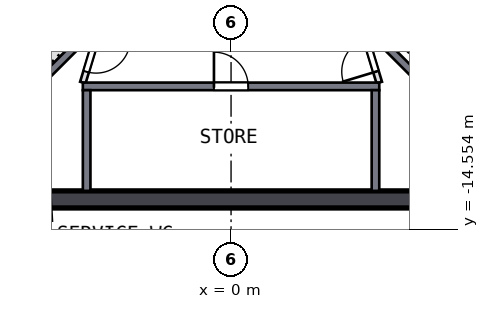
"""IFC4 building model, lengths in metres.
Left out: names, types, materials, properties, quantities, classifications, styles, units other than length and angle.
Written with IfcOpenShell. Run it as: python <this file> out.ifc"""

import sys

from ifc_helpers import new_model, si_unit, direction, frame, frame_2d, origin, place, context, subcontext, project, spatial, rectangle, extrude, element, fill, save


model = new_model("IFC4")
c1 = context("Model", 3, precision=1e-05, world=origin(), true_north=direction((0.0, 1.0)))
c2 = subcontext(c1, "Body", "Model", "MODEL_VIEW")
j1 = project(units=[si_unit("LENGTHUNIT", "METRE"), si_unit("PLANEANGLEUNIT", "RADIAN")], contexts=[c1])
p1 = place(None, origin())
s1 = spatial("IfcSite", under=j1, at=p1, CompositionType="ELEMENT")
p2 = place(p1, origin())
s2 = spatial("IfcBuilding", under=s1, at=p2, CompositionType="ELEMENT")
p3 = place(p2, frame((0.0, 0.0, 295.0)))
s3 = spatial("IfcBuildingStorey", under=s2, at=p3, CompositionType="ELEMENT", Elevation=295.0)
p4 = place(p3, frame((-5.799, -13.775, 0.0), z_axis=(0.0, 0.0, 1.0), x_axis=(1.0, 0.0, 0.0)))
e1 = element("IfcWall", 1, at=p4, inside=s3, PredefinedType="SHEAR", context=c2, shape_type="SweptSolid", body=[
    extrude(rectangle(XDim=11.598, YDim=0.45, at=frame_2d((5.799, 0.0))), origin(), (0.0, 0.0, 1.0), 4.5),
])
p5 = place(p3, frame((-3.9, -10.8, 0.0), z_axis=(0.0, 0.0, 1.0), x_axis=(1.0, 0.0, 0.0)))
e2 = element("IfcWall", 2, at=p5, inside=s3, PredefinedType="SOLIDWALL", context=c2, shape_type="SweptSolid", body=[
    extrude(rectangle(XDim=7.8, YDim=0.2, at=frame_2d((3.9, 0.0))), origin(), (0.0, 0.0, 1.0), 4.19),
])
p6 = place(p5, frame((3.45, 0.0, 0.0)))
e3 = element("IfcOpeningElement", 3, at=p6, cuts=e2, PredefinedType="OPENING", context=c2, shape_type="SweptSolid", body=[
    extrude(rectangle(XDim=0.9, YDim=2.1, at=frame_2d((0.45, 1.05))), frame((0.0, 0.11, 0.0), z_axis=(0.0, -1.0, 0.0), x_axis=(1.0, 0.0, 0.0)), (0.0, 0.0, 1.0), 0.22),
])
for number, where, z_axis, x_axis in (
    (4, (-3.8, -10.9, 0.0), (0.0, 0.0, 1.0), (0.0, -1.0, 0.0)),
    (5, (3.8, -10.9, 0.0), (0.0, 0.0, 1.0), (0.0, -1.0, 0.0)),
):
    element("IfcWall", number, at=place(p3, frame(where, z_axis=z_axis, x_axis=x_axis)), inside=s3, PredefinedType="SOLIDWALL", context=c2, shape_type="SweptSolid", body=[
        extrude(rectangle(XDim=2.65, YDim=0.2, at=frame_2d((1.325, 0.0))), origin(), (0.0, 0.0, 1.0), 4.19),
    ])
for number, where, z_axis, x_axis in (
    (6, (-3.677, -9.334, 0.0), (0.0, 0.0, 1.0), (-0.707, -0.707, 0.0)),
    (7, (3.677, -9.334, 0.0), (0.0, 0.0, 1.0), (0.707, -0.707, 0.0)),
):
    element("IfcWall", number, at=place(p3, frame(where, z_axis=z_axis, x_axis=x_axis)), inside=s3, PredefinedType="SOLIDWALL", context=c2, shape_type="SweptSolid", body=[
        extrude(rectangle(XDim=4.35, YDim=0.2, at=frame_2d((2.175, 0.0))), origin(), (0.0, 0.0, 1.0), 4.19),
    ])
p7 = place(p3, frame((-3.465, -9.263, 0.0), z_axis=(0.0, 0.0, 1.0), x_axis=(-0.289808785, -0.957084567, 0.0)))
e8 = element("IfcWall", 8, at=p7, inside=s3, PredefinedType="PARTITIONING", context=c2, shape_type="SweptSolid", body=[
    extrude(rectangle(XDim=1.501, YDim=0.15, at=frame_2d((0.75, 0.0))), origin(), (0.0, 0.0, 1.0), 4.19),
])
p8 = place(p7, frame((0.301, 0.0, 0.0)))
e9 = element("IfcOpeningElement", 9, at=p8, cuts=e8, PredefinedType="OPENING", context=c2, shape_type="SweptSolid", body=[
    extrude(rectangle(XDim=0.9, YDim=2.1, at=frame_2d((0.45, 1.05))), frame((0.0, 0.085, 0.0), z_axis=(0.0, -1.0, 0.0), x_axis=(1.0, 0.0, 0.0)), (0.0, 0.0, 1.0), 0.17),
])
p9 = place(p3, frame((3.9, -10.7, 0.0), z_axis=(0.0, 0.0, 1.0), x_axis=(-0.289808785, 0.957084567, 0.0)))
e10 = element("IfcWall", 10, at=p9, inside=s3, PredefinedType="PARTITIONING", context=c2, shape_type="SweptSolid", body=[
    extrude(rectangle(XDim=1.501, YDim=0.15, at=frame_2d((0.75, 0.0))), origin(), (0.0, 0.0, 1.0), 4.19),
])
p10 = place(p9, frame((0.301, 0.0, 0.0)))
e11 = element("IfcOpeningElement", 11, at=p10, cuts=e10, PredefinedType="OPENING", context=c2, shape_type="SweptSolid", body=[
    extrude(rectangle(XDim=0.9, YDim=2.1, at=frame_2d((0.45, 1.05))), frame((0.0, 0.085, 0.0), z_axis=(0.0, -1.0, 0.0), x_axis=(1.0, 0.0, 0.0)), (0.0, 0.0, 1.0), 0.17),
])
p11 = place(p3, frame((-3.587, -17.979, 0.0), z_axis=(0.0, 0.0, 1.0), x_axis=(-0.901234927, 0.433330828, 0.0)))
e12 = element("IfcWall", 12, at=p11, inside=s3, PredefinedType="SOLIDWALL", context=c2, shape_type="SweptSolid", body=[
    extrude(rectangle(XDim=9.116, YDim=0.2, at=frame_2d((4.558, 0.0))), origin(), (0.0, 0.0, 1.0), 4.19),
])
p12 = place(p11, frame((6.058, 0.0, 0.0)))
e13 = element("IfcOpeningElement", 13, at=p12, cuts=e12, PredefinedType="OPENING", context=c2, shape_type="SweptSolid", body=[
    extrude(rectangle(XDim=1.8, YDim=2.1, at=frame_2d((0.9, 1.05))), frame((0.0, 0.11, 0.0), z_axis=(0.0, -1.0, 0.0), x_axis=(1.0, 0.0, 0.0)), (0.0, 0.0, 1.0), 0.22),
])
p13 = place(p11, frame((2.508, 0.0, 0.0)))
e14 = element("IfcOpeningElement", 14, at=p13, cuts=e12, PredefinedType="OPENING", context=c2, shape_type="SweptSolid", body=[
    extrude(rectangle(XDim=0.9, YDim=2.1, at=frame_2d((0.45, 1.05))), frame((0.0, 0.11, 0.0), z_axis=(0.0, -1.0, 0.0), x_axis=(1.0, 0.0, 0.0)), (0.0, 0.0, 1.0), 0.22),
])
p14 = place(p11, frame((0.2, 0.0, 0.0)))
e15 = element("IfcOpeningElement", 15, at=p14, cuts=e12, PredefinedType="OPENING", context=c2, shape_type="SweptSolid", body=[
    extrude(rectangle(XDim=0.9, YDim=2.1, at=frame_2d((0.45, 1.05))), frame((0.0, 0.11, 0.0), z_axis=(0.0, -1.0, 0.0), x_axis=(1.0, 0.0, 0.0)), (0.0, 0.0, 1.0), 0.22),
])
p15 = place(p6, origin())
e16 = element("IfcDoor", 16, at=p15, inside=s3, OperationType="SINGLE_SWING_LEFT", PredefinedType="DOOR", context=c2, shape_type="SweptSolid", body=[
    extrude(rectangle(XDim=0.9, YDim=2.1, at=frame_2d((0.45, 1.05))), frame((0.0, 0.025, 0.0), z_axis=(0.0, -1.0, 0.0), x_axis=(1.0, 0.0, 0.0)), (0.0, 0.0, 1.0), 0.05),
])
fill(e3, e16)
p16 = place(p8, origin())
e17 = element("IfcDoor", 17, at=p16, inside=s3, OperationType="SINGLE_SWING_LEFT", PredefinedType="DOOR", context=c2, shape_type="SweptSolid", body=[
    extrude(rectangle(XDim=0.9, YDim=2.1, at=frame_2d((0.45, 1.05))), frame((0.0, 0.025, 0.0), z_axis=(0.0, -1.0, 0.0), x_axis=(1.0, 0.0, 0.0)), (0.0, 0.0, 1.0), 0.05),
])
fill(e9, e17)
p17 = place(p10, origin())
e18 = element("IfcDoor", 18, at=p17, inside=s3, OperationType="SINGLE_SWING_LEFT", PredefinedType="DOOR", context=c2, shape_type="SweptSolid", body=[
    extrude(rectangle(XDim=0.9, YDim=2.1, at=frame_2d((0.45, 1.05))), frame((0.0, 0.025, 0.0), z_axis=(0.0, -1.0, 0.0), x_axis=(1.0, 0.0, 0.0)), (0.0, 0.0, 1.0), 0.05),
])
fill(e11, e18)
save(model, sys.argv[1])
